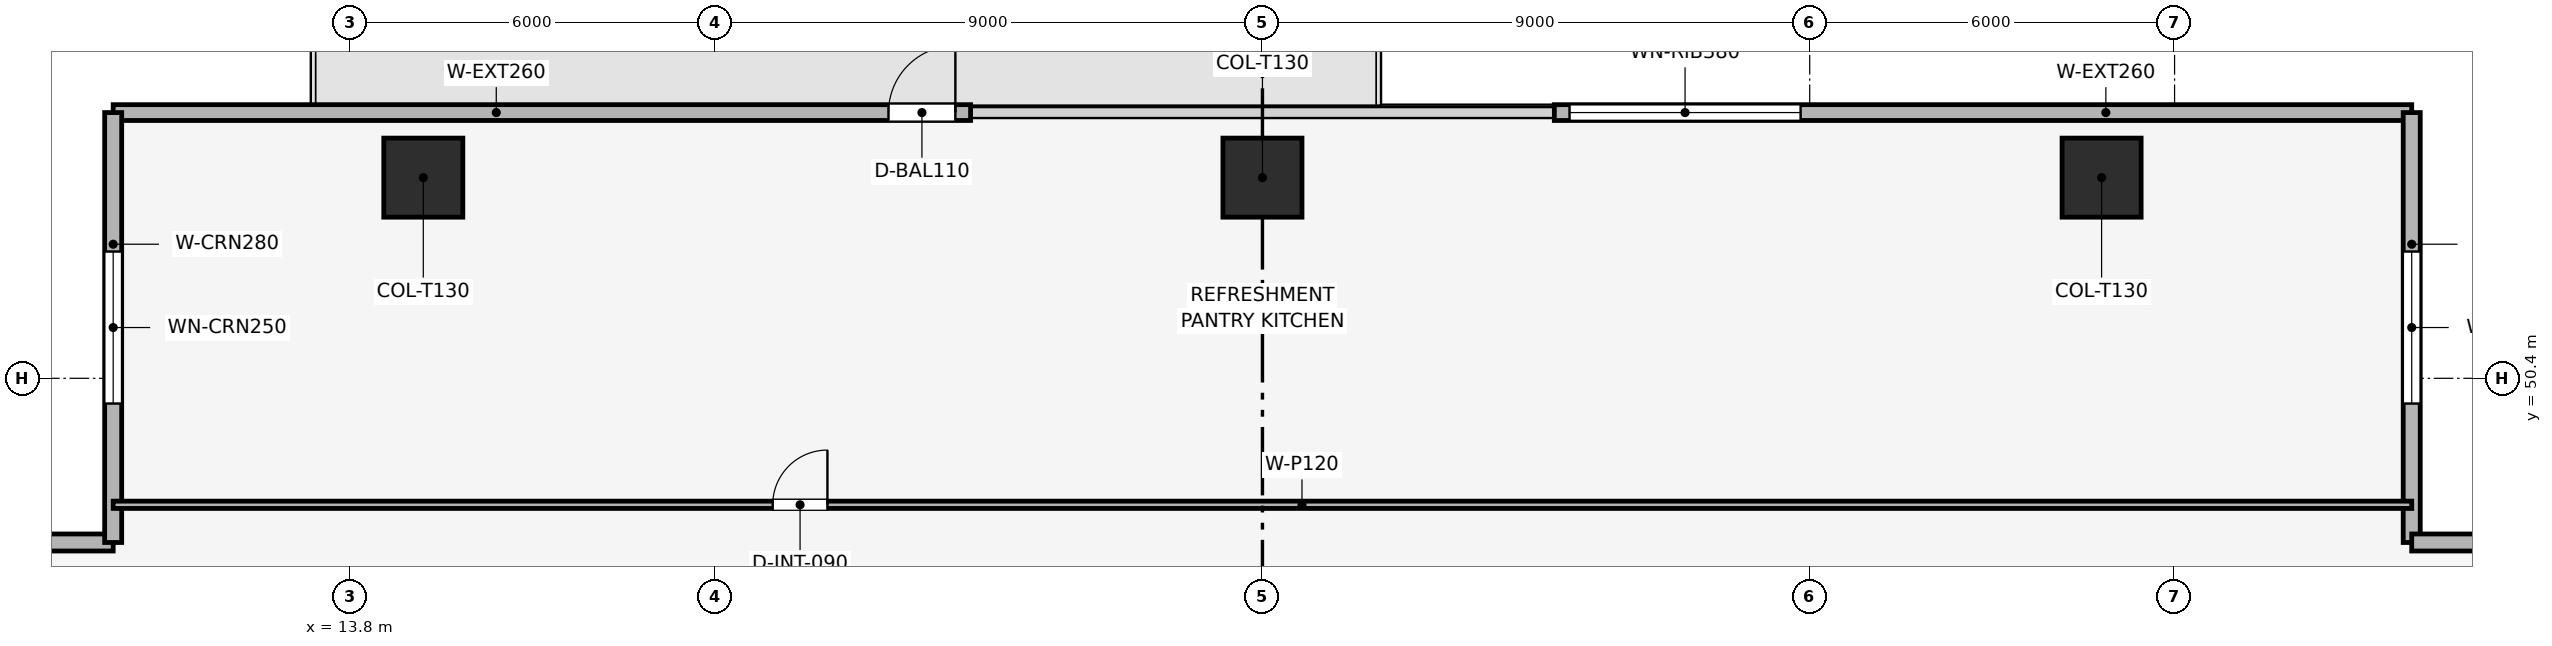
"""IFC4 building model, lengths in metres.
Left out: names, types, materials, properties, quantities, classifications, styles, units other than length and angle.
Written with IfcOpenShell. Run it as: python <this file> out.ifc"""

import sys

from ifc_helpers import new_model, si_unit, direction, frame, frame_2d, origin, origin_2d, place, context, subcontext, project, spatial, rectangle, extrude, element, fill, save


model = new_model("IFC4")
c1 = context("Model", 3, precision=1e-05, world=origin(), true_north=direction((0.0, 1.0)))
c2 = subcontext(c1, "Body", "Model", "MODEL_VIEW")
j1 = project(units=[si_unit("LENGTHUNIT", "METRE"), si_unit("PLANEANGLEUNIT", "RADIAN")], contexts=[c1])
p1 = place(None, origin())
s1 = spatial("IfcSite", under=j1, at=p1, CompositionType="ELEMENT")
p2 = place(p1, origin())
s2 = spatial("IfcBuilding", under=s1, at=p2, CompositionType="ELEMENT")
p3 = place(p2, frame((0.0, 0.0, 121.2)))
s3 = spatial("IfcBuildingStorey", under=s2, at=p3, CompositionType="ELEMENT", Elevation=121.2)
for number, where, z_axis, x_axis in (
    (1, (42.6, 53.7, 0.003), (0.0, 0.0, 1.0), (1.0, 0.0, 0.0)),
    (2, (28.8, 53.7, 0.003), (0.0, 0.0, 1.0), (1.0, 0.0, 0.0)),
    (3, (15.0, 53.7, 0.003), (0.0, 0.0, 1.0), (1.0, 0.0, 0.0)),
):
    element("IfcColumn", number, at=place(p3, frame(where, z_axis=z_axis, x_axis=x_axis)), inside=s3, PredefinedType="COLUMN", context=c2, shape_type="SweptSolid", body=[
        extrude(rectangle(XDim=1.3, YDim=1.3, at=origin_2d()), origin(), (0.0, 0.0, 1.0), 3.644),
    ])
p4 = place(p3, frame((9.9, 54.77, 0.0), z_axis=(0.0, 0.0, 1.0), x_axis=(1.0, 0.0, 0.0)))
e4 = element("IfcWall", 4, at=p4, inside=s3, PredefinedType="SOLIDWALL", context=c2, shape_type="SweptSolid", body=[
    extrude(rectangle(XDim=14.1, YDim=0.26, at=frame_2d((7.05, 0.0))), origin(), (0.0, 0.0, 1.0), 3.65),
])
p5 = place(p4, frame((12.75, 0.0, 0.0)))
e5 = element("IfcOpeningElement", 5, at=p5, cuts=e4, PredefinedType="OPENING", context=c2, shape_type="SweptSolid", body=[
    extrude(rectangle(XDim=1.1, YDim=2.2, at=frame_2d((0.55, 1.1))), frame((0.0, 0.14, 0.0), z_axis=(0.0, -1.0, 0.0), x_axis=(1.0, 0.0, 0.0)), (0.0, 0.0, 1.0), 0.28),
])
p6 = place(p3, frame((33.6, 54.77, 0.0), z_axis=(0.0, 0.0, 1.0), x_axis=(1.0, 0.0, 0.0)))
e6 = element("IfcWall", 6, at=p6, inside=s3, PredefinedType="SOLIDWALL", context=c2, shape_type="SweptSolid", body=[
    extrude(rectangle(XDim=14.1, YDim=0.26, at=frame_2d((7.05, 0.0))), origin(), (0.0, 0.0, 1.0), 3.65),
])
p7 = place(p6, frame((0.25, 0.0, 0.9)))
e7 = element("IfcOpeningElement", 7, at=p7, cuts=e6, PredefinedType="OPENING", context=c2, shape_type="SweptSolid", body=[
    extrude(rectangle(XDim=3.8, YDim=1.9, at=frame_2d((1.9, 0.95))), frame((0.0, 0.14, 0.0), z_axis=(0.0, -1.0, 0.0), x_axis=(1.0, 0.0, 0.0)), (0.0, 0.0, 1.0), 0.28),
])
p8 = place(p3, frame((2.83, 47.7, 0.0), z_axis=(0.0, 0.0, 1.0), x_axis=(1.0, 0.0, 0.0)))
e8 = element("IfcWall", 8, at=p8, inside=s3, PredefinedType="SOLIDWALL", context=c2, shape_type="SweptSolid", body=[
    extrude(rectangle(XDim=7.07, YDim=0.28, at=frame_2d((3.535, 0.0))), origin(), (0.0, 0.0, 1.0), 3.65),
])
p9 = place(p8, frame((2.285, 0.0, 0.9)))
e9 = element("IfcOpeningElement", 9, at=p9, cuts=e8, PredefinedType="OPENING", context=c2, shape_type="SweptSolid", body=[
    extrude(rectangle(XDim=2.5, YDim=1.9, at=frame_2d((1.25, 0.95))), frame((0.0, 0.15, 0.0), z_axis=(0.0, -1.0, 0.0), x_axis=(1.0, 0.0, 0.0)), (0.0, 0.0, 1.0), 0.3),
])
p10 = place(p3, frame((9.9, 47.7, 0.0), z_axis=(0.0, 0.0, 1.0), x_axis=(0.0, 1.0, 0.0)))
e10 = element("IfcWall", 10, at=p10, inside=s3, PredefinedType="SOLIDWALL", context=c2, shape_type="SweptSolid", body=[
    extrude(rectangle(XDim=7.07, YDim=0.28, at=frame_2d((3.535, 0.0))), origin(), (0.0, 0.0, 1.0), 3.65),
])
p11 = place(p10, frame((2.285, 0.0, 0.9)))
e11 = element("IfcOpeningElement", 11, at=p11, cuts=e10, PredefinedType="OPENING", context=c2, shape_type="SweptSolid", body=[
    extrude(rectangle(XDim=2.5, YDim=1.9, at=frame_2d((1.25, 0.95))), frame((0.0, 0.15, 0.0), z_axis=(0.0, -1.0, 0.0), x_axis=(1.0, 0.0, 0.0)), (0.0, 0.0, 1.0), 0.3),
])
p12 = place(p3, frame((47.7, 54.77, 0.0), z_axis=(0.0, 0.0, 1.0), x_axis=(0.0, -1.0, 0.0)))
e12 = element("IfcWall", 12, at=p12, inside=s3, PredefinedType="SOLIDWALL", context=c2, shape_type="SweptSolid", body=[
    extrude(rectangle(XDim=7.07, YDim=0.28, at=frame_2d((3.535, 0.0))), origin(), (0.0, 0.0, 1.0), 3.65),
])
p13 = place(p12, frame((2.285, 0.0, 0.9)))
e13 = element("IfcOpeningElement", 13, at=p13, cuts=e12, PredefinedType="OPENING", context=c2, shape_type="SweptSolid", body=[
    extrude(rectangle(XDim=2.5, YDim=1.9, at=frame_2d((1.25, 0.95))), frame((0.0, 0.15, 0.0), z_axis=(0.0, -1.0, 0.0), x_axis=(1.0, 0.0, 0.0)), (0.0, 0.0, 1.0), 0.3),
])
p14 = place(p3, frame((47.7, 47.7, 0.0), z_axis=(0.0, 0.0, 1.0), x_axis=(1.0, 0.0, 0.0)))
e14 = element("IfcWall", 14, at=p14, inside=s3, PredefinedType="SOLIDWALL", context=c2, shape_type="SweptSolid", body=[
    extrude(rectangle(XDim=7.07, YDim=0.28, at=frame_2d((3.535, 0.0))), origin(), (0.0, 0.0, 1.0), 3.65),
])
p15 = place(p14, frame((2.285, 0.0, 0.9)))
e15 = element("IfcOpeningElement", 15, at=p15, cuts=e14, PredefinedType="OPENING", context=c2, shape_type="SweptSolid", body=[
    extrude(rectangle(XDim=2.5, YDim=1.9, at=frame_2d((1.25, 0.95))), frame((0.0, 0.15, 0.0), z_axis=(0.0, -1.0, 0.0), x_axis=(1.0, 0.0, 0.0)), (0.0, 0.0, 1.0), 0.3),
])
p16 = place(p3, frame((9.9, 48.32, 0.0), z_axis=(0.0, 0.0, 1.0), x_axis=(1.0, 0.0, 0.0)))
e16 = element("IfcWall", 16, at=p16, inside=s3, PredefinedType="PARTITIONING", context=c2, shape_type="SweptSolid", body=[
    extrude(rectangle(XDim=37.8, YDim=0.12, at=frame_2d((18.9, 0.0))), origin(), (0.0, 0.0, 1.0), 3.035),
])
p17 = place(p16, frame((10.846, 0.0, 0.0)))
e17 = element("IfcOpeningElement", 17, at=p17, cuts=e16, PredefinedType="OPENING", context=c2, shape_type="SweptSolid", body=[
    extrude(rectangle(XDim=0.9, YDim=2.1, at=frame_2d((0.45, 1.05))), frame((0.0, 0.07, 0.0), z_axis=(0.0, -1.0, 0.0), x_axis=(1.0, 0.0, 0.0)), (0.0, 0.0, 1.0), 0.14),
])
p18 = place(p5, origin())
e18 = element("IfcDoor", 18, at=p18, inside=s3, OperationType="SINGLE_SWING_RIGHT", PredefinedType="DOOR", context=c2, shape_type="SweptSolid", body=[
    extrude(rectangle(XDim=1.1, YDim=2.2, at=frame_2d((0.55, 1.1))), frame((0.0, 0.025, 0.0), z_axis=(0.0, -1.0, 0.0), x_axis=(1.0, 0.0, 0.0)), (0.0, 0.0, 1.0), 0.05),
])
fill(e5, e18)
p19 = place(p7, origin())
e19 = element("IfcWindow", 19, at=p19, inside=s3, PartitioningType="SINGLE_PANEL", PredefinedType="WINDOW", context=c2, shape_type="SweptSolid", body=[
    extrude(rectangle(XDim=3.8, YDim=1.9, at=frame_2d((1.9, 0.95))), frame((0.0, 0.03, 0.0), z_axis=(0.0, -1.0, 0.0), x_axis=(1.0, 0.0, 0.0)), (0.0, 0.0, 1.0), 0.06),
])
fill(e7, e19)
p20 = place(p11, origin())
e20 = element("IfcWindow", 20, at=p20, inside=s3, PartitioningType="SINGLE_PANEL", PredefinedType="WINDOW", context=c2, shape_type="SweptSolid", body=[
    extrude(rectangle(XDim=2.5, YDim=1.9, at=frame_2d((1.25, 0.95))), frame((0.0, 0.03, 0.0), z_axis=(0.0, -1.0, 0.0), x_axis=(1.0, 0.0, 0.0)), (0.0, 0.0, 1.0), 0.06),
])
fill(e11, e20)
p21 = place(p13, origin())
e21 = element("IfcWindow", 21, at=p21, inside=s3, PartitioningType="SINGLE_PANEL", PredefinedType="WINDOW", context=c2, shape_type="SweptSolid", body=[
    extrude(rectangle(XDim=2.5, YDim=1.9, at=frame_2d((1.25, 0.95))), frame((0.0, 0.03, 0.0), z_axis=(0.0, -1.0, 0.0), x_axis=(1.0, 0.0, 0.0)), (0.0, 0.0, 1.0), 0.06),
])
fill(e13, e21)
p22 = place(p17, origin())
e22 = element("IfcDoor", 22, at=p22, inside=s3, OperationType="SINGLE_SWING_RIGHT", PredefinedType="DOOR", context=c2, shape_type="SweptSolid", body=[
    extrude(rectangle(XDim=0.9, YDim=2.1, at=frame_2d((0.45, 1.05))), frame((0.0, 0.025, 0.0), z_axis=(0.0, -1.0, 0.0), x_axis=(1.0, 0.0, 0.0)), (0.0, 0.0, 1.0), 0.05),
])
fill(e17, e22)
save(model, sys.argv[1])
